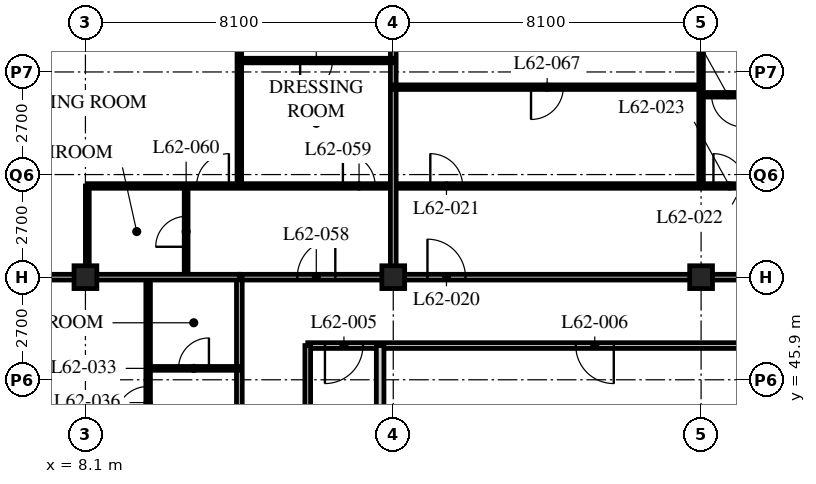
"""IFC4 building model, lengths in metres.
Left out: names, types, materials, properties, quantities, classifications, styles, units other than length and angle.
Written with IfcOpenShell. Run it as: python <this file> out.ifc"""

import sys

from ifc_helpers import new_model, si_unit, direction, frame, frame_2d, origin, origin_2d, place, context, subcontext, project, spatial, rectangle, hollow_rectangle, extrude, element, fill, save


model = new_model("IFC4")
c1 = context("Model", 3, precision=1e-05, world=origin(), true_north=direction((0.0, 1.0)))
c2 = subcontext(c1, "Body", "Model", "MODEL_VIEW")
j1 = project(units=[si_unit("LENGTHUNIT", "METRE"), si_unit("PLANEANGLEUNIT", "RADIAN")], contexts=[c1])
p1 = place(None, origin())
s1 = spatial("IfcSite", under=j1, at=p1, CompositionType="ELEMENT")
p2 = place(p1, origin())
s2 = spatial("IfcBuilding", under=s1, at=p2, CompositionType="ELEMENT")
p3 = place(p2, frame((0.0, 0.0, 242.4)))
s3 = spatial("IfcBuildingStorey", under=s2, at=p3, CompositionType="ELEMENT", Elevation=242.4)
for number, where, z_axis, x_axis in (
    (1, (8.1, 48.6, 0.0), (0.0, 0.0, 1.0), (1.0, 0.0, 0.0)),
    (2, (16.2, 48.6, 0.0), (0.0, 0.0, 1.0), (1.0, 0.0, 0.0)),
    (3, (24.3, 48.6, 0.0), (0.0, 0.0, 1.0), (1.0, 0.0, 0.0)),
):
    element("IfcColumn", number, at=place(p3, frame(where, z_axis=z_axis, x_axis=x_axis)), inside=s3, PredefinedType="COLUMN", context=c2, shape_type="SweptSolid", body=[
        extrude(hollow_rectangle(XDim=0.6, YDim=0.6, WallThickness=0.05, at=origin_2d()), origin(), (0.0, 0.0, 1.0), 3.9),
    ])
p4 = place(p3, frame((12.15, 48.6, 0.0), z_axis=(0.0, 0.0, 1.0), x_axis=(1.0, 0.0, 0.0)))
e4 = element("IfcWall", 4, at=p4, inside=s3, PredefinedType="PARTITIONING", context=c2, shape_type="SweptSolid", body=[
    extrude(rectangle(XDim=32.4, YDim=0.15, at=frame_2d((16.2, 0.0))), origin(), (0.0, 0.0, 1.0), 2.928),
])
p5 = place(p4, frame((4.95, 0.0, 0.0)))
e5 = element("IfcOpeningElement", 5, at=p5, cuts=e4, PredefinedType="OPENING", context=c2, shape_type="SweptSolid", body=[
    extrude(rectangle(XDim=1.0, YDim=2.1, at=frame_2d((0.5, 1.05))), frame((0.0, 0.085, 0.0), z_axis=(0.0, -1.0, 0.0), x_axis=(1.0, 0.0, 0.0)), (0.0, 0.0, 1.0), 0.17),
])
p6 = place(p4, frame((21.15, 0.0, 0.0)))
e6 = element("IfcOpeningElement", 6, at=p6, cuts=e4, PredefinedType="OPENING", context=c2, shape_type="SweptSolid", body=[
    extrude(rectangle(XDim=1.0, YDim=2.1, at=frame_2d((0.5, 1.05))), frame((0.0, 0.085, 0.0), z_axis=(0.0, -1.0, 0.0), x_axis=(1.0, 0.0, 0.0)), (0.0, 0.0, 1.0), 0.17),
])
p7 = place(p4, frame((29.875, 0.0, 0.0)))
e7 = element("IfcOpeningElement", 7, at=p7, cuts=e4, PredefinedType="OPENING", context=c2, shape_type="SweptSolid", body=[
    extrude(rectangle(XDim=1.0, YDim=2.1, at=frame_2d((0.5, 1.05))), frame((0.0, 0.085, 0.0), z_axis=(0.0, -1.0, 0.0), x_axis=(1.0, 0.0, 0.0)), (0.0, 0.0, 1.0), 0.17),
])
p8 = place(p4, frame((1.525, 0.0, 0.0)))
e8 = element("IfcOpeningElement", 8, at=p8, cuts=e4, PredefinedType="OPENING", context=c2, shape_type="SweptSolid", body=[
    extrude(rectangle(XDim=1.0, YDim=2.1, at=frame_2d((0.5, 1.05))), frame((0.0, 0.085, 0.0), z_axis=(0.0, -1.0, 0.0), x_axis=(1.0, 0.0, 0.0)), (0.0, 0.0, 1.0), 0.17),
])
p9 = place(p3, frame((12.15, 22.5, 0.0), z_axis=(0.0, 0.0, 1.0), x_axis=(0.0, 1.0, 0.0)))
e9 = element("IfcWall", 9, at=p9, inside=s3, PredefinedType="PARTITIONING", context=c2, shape_type="SweptSolid", body=[
    extrude(rectangle(XDim=26.1, YDim=0.15, at=frame_2d((13.05, 0.0))), origin(), (0.0, 0.0, 1.0), 3.69),
])
p10 = place(p9, frame((0.4, 0.0, 0.0)))
e10 = element("IfcOpeningElement", 10, at=p10, cuts=e9, PredefinedType="OPENING", context=c2, shape_type="SweptSolid", body=[
    extrude(rectangle(XDim=1.0, YDim=2.1, at=frame_2d((0.5, 1.05))), frame((0.0, 0.085, 0.0), z_axis=(0.0, -1.0, 0.0), x_axis=(1.0, 0.0, 0.0)), (0.0, 0.0, 1.0), 0.17),
])
p11 = place(p9, frame((14.35, 0.0, 0.0)))
e11 = element("IfcOpeningElement", 11, at=p11, cuts=e9, PredefinedType="OPENING", context=c2, shape_type="SweptSolid", body=[
    extrude(rectangle(XDim=1.0, YDim=2.1, at=frame_2d((0.5, 1.05))), frame((0.0, 0.085, 0.0), z_axis=(0.0, -1.0, 0.0), x_axis=(1.0, 0.0, 0.0)), (0.0, 0.0, 1.0), 0.17),
])
p12 = place(p3, frame((27.14, 46.8, 0.0), z_axis=(0.0, 0.0, 1.0), x_axis=(-1.0, 0.0, 0.0)))
e12 = element("IfcWall", 12, at=p12, inside=s3, PredefinedType="PARTITIONING", context=c2, shape_type="SweptSolid", body=[
    extrude(rectangle(XDim=13.19, YDim=0.15, at=frame_2d((6.595, 0.0))), origin(), (0.0, 0.0, 1.0), 3.69),
])
p13 = place(p12, frame((11.738, 0.0, 0.0)))
e13 = element("IfcOpeningElement", 13, at=p13, cuts=e12, PredefinedType="OPENING", context=c2, shape_type="SweptSolid", body=[
    extrude(rectangle(XDim=1.0, YDim=2.1, at=frame_2d((0.5, 1.05))), frame((0.0, 0.085, 0.0), z_axis=(0.0, -1.0, 0.0), x_axis=(1.0, 0.0, 0.0)), (0.0, 0.0, 1.0), 0.17),
])
p14 = place(p12, frame((5.138, 0.0, 0.0)))
e14 = element("IfcOpeningElement", 14, at=p14, cuts=e12, PredefinedType="OPENING", context=c2, shape_type="SweptSolid", body=[
    extrude(rectangle(XDim=1.0, YDim=2.1, at=frame_2d((0.5, 1.05))), frame((0.0, 0.085, 0.0), z_axis=(0.0, -1.0, 0.0), x_axis=(1.0, 0.0, 0.0)), (0.0, 0.0, 1.0), 0.17),
])
p15 = place(p3, frame((13.95, 46.8, 0.0), z_axis=(0.0, 0.0, 1.0), x_axis=(0.0, -1.0, 0.0)))
e15 = element("IfcWall", 15, at=p15, inside=s3, PredefinedType="PARTITIONING", context=c2, shape_type="SweptSolid", body=[
    extrude(rectangle(XDim=22.5, YDim=0.15, at=frame_2d((11.25, 0.0))), origin(), (0.0, 0.0, 1.0), 3.69),
])
p16 = place(p15, frame((17.95, 0.0, 0.0)))
e16 = element("IfcOpeningElement", 16, at=p16, cuts=e15, PredefinedType="OPENING", context=c2, shape_type="SweptSolid", body=[
    extrude(rectangle(XDim=1.0, YDim=2.1, at=frame_2d((0.5, 1.05))), frame((0.0, 0.085, 0.0), z_axis=(0.0, -1.0, 0.0), x_axis=(1.0, 0.0, 0.0)), (0.0, 0.0, 1.0), 0.17),
])
p17 = place(p15, frame((9.85, 0.0, 0.0)))
e17 = element("IfcOpeningElement", 17, at=p17, cuts=e15, PredefinedType="OPENING", context=c2, shape_type="SweptSolid", body=[
    extrude(rectangle(XDim=1.0, YDim=2.1, at=frame_2d((0.5, 1.05))), frame((0.0, 0.085, 0.0), z_axis=(0.0, -1.0, 0.0), x_axis=(1.0, 0.0, 0.0)), (0.0, 0.0, 1.0), 0.17),
])
p18 = place(p3, frame((15.855, 46.8, 0.0), z_axis=(0.0, 0.0, 1.0), x_axis=(0.0, -1.0, 0.0)))
e18 = element("IfcWall", 18, at=p18, inside=s3, PredefinedType="SOLIDWALL", context=c2, shape_type="SweptSolid", body=[
    extrude(rectangle(XDim=6.3, YDim=0.2, at=frame_2d((3.15, 0.0))), origin(), (0.0, 0.0, 1.0), 3.69),
])
p19 = place(p3, frame((24.3, 51.0, 0.0), z_axis=(0.0, 0.0, 1.0), x_axis=(0.0, 1.0, 0.0)))
e19 = element("IfcWall", 19, at=p19, inside=s3, PredefinedType="PARTITIONING", context=c2, shape_type="SweptSolid", body=[
    extrude(rectangle(XDim=13.5, YDim=0.12, at=frame_2d((6.75, 0.0))), origin(), (0.0, 0.0, 1.0), 2.928),
])
p20 = place(p3, frame((9.75, 22.5, 0.0), z_axis=(0.0, 0.0, 1.0), x_axis=(0.0, 1.0, 0.0)))
e20 = element("IfcWall", 20, at=p20, inside=s3, PredefinedType="PARTITIONING", context=c2, shape_type="SweptSolid", body=[
    extrude(rectangle(XDim=26.1, YDim=0.12, at=frame_2d((13.05, 0.0))), origin(), (0.0, 0.0, 1.0), 3.69),
])
p21 = place(p20, frame((0.975, 0.0, 0.0)))
e21 = element("IfcOpeningElement", 21, at=p21, cuts=e20, PredefinedType="OPENING", context=c2, shape_type="SweptSolid", body=[
    extrude(rectangle(XDim=0.85, YDim=2.1, at=frame_2d((0.425, 1.05))), frame((0.0, 0.07, 0.0), z_axis=(0.0, -1.0, 0.0), x_axis=(1.0, 0.0, 0.0)), (0.0, 0.0, 1.0), 0.14),
])
p22 = place(p20, frame((10.225, 0.0, 0.0)))
e22 = element("IfcOpeningElement", 22, at=p22, cuts=e20, PredefinedType="OPENING", context=c2, shape_type="SweptSolid", body=[
    extrude(rectangle(XDim=0.85, YDim=2.1, at=frame_2d((0.425, 1.05))), frame((0.0, 0.07, 0.0), z_axis=(0.0, -1.0, 0.0), x_axis=(1.0, 0.0, 0.0)), (0.0, 0.0, 1.0), 0.14),
])
p23 = place(p20, frame((14.925, 0.0, 0.0)))
e23 = element("IfcOpeningElement", 23, at=p23, cuts=e20, PredefinedType="OPENING", context=c2, shape_type="SweptSolid", body=[
    extrude(rectangle(XDim=0.85, YDim=2.1, at=frame_2d((0.425, 1.05))), frame((0.0, 0.07, 0.0), z_axis=(0.0, -1.0, 0.0), x_axis=(1.0, 0.0, 0.0)), (0.0, 0.0, 1.0), 0.14),
])
p24 = place(p20, frame((22.375, 0.0, 0.0)))
e24 = element("IfcOpeningElement", 24, at=p24, cuts=e20, PredefinedType="OPENING", context=c2, shape_type="SweptSolid", body=[
    extrude(rectangle(XDim=0.85, YDim=2.1, at=frame_2d((0.425, 1.05))), frame((0.0, 0.07, 0.0), z_axis=(0.0, -1.0, 0.0), x_axis=(1.0, 0.0, 0.0)), (0.0, 0.0, 1.0), 0.14),
])
p25 = place(p3, frame((12.15, 46.2, 0.0), z_axis=(0.0, 0.0, 1.0), x_axis=(-1.0, 0.0, 0.0)))
e25 = element("IfcWall", 25, at=p25, inside=s3, PredefinedType="PARTITIONING", context=c2, shape_type="SweptSolid", body=[
    extrude(rectangle(XDim=2.4, YDim=0.1, at=frame_2d((1.2, 0.0))), origin(), (0.0, 0.0, 1.0), 3.69),
])
p26 = place(p25, frame((0.8, 0.0, 0.0)))
e26 = element("IfcOpeningElement", 26, at=p26, cuts=e25, PredefinedType="OPENING", context=c2, shape_type="SweptSolid", body=[
    extrude(rectangle(XDim=0.8, YDim=2.1, at=frame_2d((0.4, 1.05))), frame((0.0, 0.06, 0.0), z_axis=(0.0, -1.0, 0.0), x_axis=(1.0, 0.0, 0.0)), (0.0, 0.0, 1.0), 0.12),
])
p27 = place(p3, frame((10.75, 48.6, 0.0), z_axis=(0.0, 0.0, 1.0), x_axis=(0.0, 1.0, 0.0)))
e27 = element("IfcWall", 27, at=p27, inside=s3, PredefinedType="PARTITIONING", context=c2, shape_type="SweptSolid", body=[
    extrude(rectangle(XDim=2.4, YDim=0.1, at=frame_2d((1.2, 0.0))), origin(), (0.0, 0.0, 1.0), 3.69),
])
p28 = place(p27, frame((0.8, 0.0, 0.0)))
e28 = element("IfcOpeningElement", 28, at=p28, cuts=e27, PredefinedType="OPENING", context=c2, shape_type="SweptSolid", body=[
    extrude(rectangle(XDim=0.8, YDim=2.1, at=frame_2d((0.4, 1.05))), frame((0.0, 0.06, 0.0), z_axis=(0.0, -1.0, 0.0), x_axis=(1.0, 0.0, 0.0)), (0.0, 0.0, 1.0), 0.12),
])
p29 = place(p3, frame((8.15, 48.6, 0.0), z_axis=(0.0, 0.0, 1.0), x_axis=(0.0, 1.0, 0.0)))
e29 = element("IfcWall", 29, at=p29, inside=s3, PredefinedType="PARTITIONING", context=c2, shape_type="SweptSolid", body=[
    extrude(rectangle(XDim=2.4, YDim=0.1, at=frame_2d((1.2, 0.0))), origin(), (0.0, 0.0, 1.0), 2.928),
])
p30 = place(p3, frame((8.15, 51.0, 0.0), z_axis=(0.0, 0.0, 1.0), x_axis=(1.0, 0.0, 0.0)))
e30 = element("IfcWall", 30, at=p30, inside=s3, PredefinedType="PARTITIONING", context=c2, shape_type="SweptSolid", body=[
    extrude(rectangle(XDim=40.4, YDim=0.12, at=frame_2d((20.2, 0.0))), origin(), (0.0, 0.0, 1.0), 3.69),
])
p31 = place(p30, frame((9.025, 0.0, 0.0)))
e31 = element("IfcOpeningElement", 31, at=p31, cuts=e30, PredefinedType="OPENING", context=c2, shape_type="SweptSolid", body=[
    extrude(rectangle(XDim=0.85, YDim=2.1, at=frame_2d((0.425, 1.05))), frame((0.0, 0.07, 0.0), z_axis=(0.0, -1.0, 0.0), x_axis=(1.0, 0.0, 0.0)), (0.0, 0.0, 1.0), 0.14),
])
p32 = place(p30, frame((16.475, 0.0, 0.0)))
e32 = element("IfcOpeningElement", 32, at=p32, cuts=e30, PredefinedType="OPENING", context=c2, shape_type="SweptSolid", body=[
    extrude(rectangle(XDim=0.85, YDim=2.1, at=frame_2d((0.425, 1.05))), frame((0.0, 0.07, 0.0), z_axis=(0.0, -1.0, 0.0), x_axis=(1.0, 0.0, 0.0)), (0.0, 0.0, 1.0), 0.14),
])
p33 = place(p30, frame((20.525, 0.0, 0.0)))
e33 = element("IfcOpeningElement", 33, at=p33, cuts=e30, PredefinedType="OPENING", context=c2, shape_type="SweptSolid", body=[
    extrude(rectangle(XDim=0.85, YDim=2.1, at=frame_2d((0.425, 1.05))), frame((0.0, 0.07, 0.0), z_axis=(0.0, -1.0, 0.0), x_axis=(1.0, 0.0, 0.0)), (0.0, 0.0, 1.0), 0.14),
])
p34 = place(p30, frame((25.225, 0.0, 0.0)))
e34 = element("IfcOpeningElement", 34, at=p34, cuts=e30, PredefinedType="OPENING", context=c2, shape_type="SweptSolid", body=[
    extrude(rectangle(XDim=0.85, YDim=2.1, at=frame_2d((0.425, 1.05))), frame((0.0, 0.07, 0.0), z_axis=(0.0, -1.0, 0.0), x_axis=(1.0, 0.0, 0.0)), (0.0, 0.0, 1.0), 0.14),
])
p35 = place(p30, frame((28.625, 0.0, 0.0)))
e35 = element("IfcOpeningElement", 35, at=p35, cuts=e30, PredefinedType="OPENING", context=c2, shape_type="SweptSolid", body=[
    extrude(rectangle(XDim=0.85, YDim=2.1, at=frame_2d((0.425, 1.05))), frame((0.0, 0.07, 0.0), z_axis=(0.0, -1.0, 0.0), x_axis=(1.0, 0.0, 0.0)), (0.0, 0.0, 1.0), 0.14),
])
p36 = place(p30, frame((32.825, 0.0, 0.0)))
e36 = element("IfcOpeningElement", 36, at=p36, cuts=e30, PredefinedType="OPENING", context=c2, shape_type="SweptSolid", body=[
    extrude(rectangle(XDim=0.85, YDim=2.1, at=frame_2d((0.425, 1.05))), frame((0.0, 0.07, 0.0), z_axis=(0.0, -1.0, 0.0), x_axis=(1.0, 0.0, 0.0)), (0.0, 0.0, 1.0), 0.14),
])
p37 = place(p30, frame((36.675, 0.0, 0.0)))
e37 = element("IfcOpeningElement", 37, at=p37, cuts=e30, PredefinedType="OPENING", context=c2, shape_type="SweptSolid", body=[
    extrude(rectangle(XDim=0.85, YDim=2.1, at=frame_2d((0.425, 1.05))), frame((0.0, 0.07, 0.0), z_axis=(0.0, -1.0, 0.0), x_axis=(1.0, 0.0, 0.0)), (0.0, 0.0, 1.0), 0.14),
])
p38 = place(p30, frame((6.725, 0.0, 0.0)))
e38 = element("IfcOpeningElement", 38, at=p38, cuts=e30, PredefinedType="OPENING", context=c2, shape_type="SweptSolid", body=[
    extrude(rectangle(XDim=0.85, YDim=2.1, at=frame_2d((0.425, 1.05))), frame((0.0, 0.07, 0.0), z_axis=(0.0, -1.0, 0.0), x_axis=(1.0, 0.0, 0.0)), (0.0, 0.0, 1.0), 0.14),
])
p39 = place(p30, frame((2.875, 0.0, 0.0)))
e39 = element("IfcOpeningElement", 39, at=p39, cuts=e30, PredefinedType="OPENING", context=c2, shape_type="SweptSolid", body=[
    extrude(rectangle(XDim=0.85, YDim=2.1, at=frame_2d((0.425, 1.05))), frame((0.0, 0.07, 0.0), z_axis=(0.0, -1.0, 0.0), x_axis=(1.0, 0.0, 0.0)), (0.0, 0.0, 1.0), 0.14),
])
p40 = place(p3, frame((12.15, 51.0, 0.0), z_axis=(0.0, 0.0, 1.0), x_axis=(0.0, 1.0, 0.0)))
e40 = element("IfcWall", 40, at=p40, inside=s3, PredefinedType="PARTITIONING", context=c2, shape_type="SweptSolid", body=[
    extrude(rectangle(XDim=13.5, YDim=0.12, at=frame_2d((6.75, 0.0))), origin(), (0.0, 0.0, 1.0), 3.69),
])
p41 = place(p3, frame((0.3, 48.6, 0.0), z_axis=(0.0, 0.0, 1.0), x_axis=(1.0, 0.0, 0.0)))
e41 = element("IfcWall", 41, at=p41, inside=s3, PredefinedType="PARTITIONING", context=c2, shape_type="SweptSolid", body=[
    extrude(rectangle(XDim=11.85, YDim=0.15, at=frame_2d((5.925, 0.0))), origin(), (0.0, 0.0, 1.0), 2.928),
])
p42 = place(p3, frame((16.2, 48.6, 0.0), z_axis=(0.0, 0.0, 1.0), x_axis=(0.0, 1.0, 0.0)))
e42 = element("IfcWall", 42, at=p42, inside=s3, PredefinedType="PARTITIONING", context=c2, shape_type="SweptSolid", body=[
    extrude(rectangle(XDim=15.9, YDim=0.15, at=frame_2d((7.95, 0.0))), origin(), (0.0, 0.0, 1.0), 2.928),
])
p43 = place(p3, frame((24.3, 53.4, 0.0), z_axis=(0.0, 0.0, 1.0), x_axis=(1.0, 0.0, 0.0)))
e43 = element("IfcWall", 43, at=p43, inside=s3, PredefinedType="PARTITIONING", context=c2, shape_type="SweptSolid", body=[
    extrude(rectangle(XDim=1.76, YDim=0.12, at=frame_2d((0.88, 0.0))), origin(), (0.0, 0.0, 1.0), 3.69),
])
p44 = place(p43, frame((0.275, 0.0, 0.0)))
e44 = element("IfcOpeningElement", 44, at=p44, cuts=e43, PredefinedType="OPENING", context=c2, shape_type="SweptSolid", body=[
    extrude(rectangle(XDim=0.85, YDim=2.1, at=frame_2d((0.425, 1.05))), frame((0.0, 0.07, 0.0), z_axis=(0.0, -1.0, 0.0), x_axis=(1.0, 0.0, 0.0)), (0.0, 0.0, 1.0), 0.14),
])
p45 = place(p3, frame((16.2, 53.6, 0.0), z_axis=(0.0, 0.0, 1.0), x_axis=(1.0, 0.0, 0.0)))
e45 = element("IfcWall", 45, at=p45, inside=s3, PredefinedType="PARTITIONING", context=c2, shape_type="SweptSolid", body=[
    extrude(rectangle(XDim=8.1, YDim=0.12, at=frame_2d((4.05, 0.0))), origin(), (0.0, 0.0, 1.0), 3.69),
])
p46 = place(p45, frame((3.625, 0.0, 0.0)))
e46 = element("IfcOpeningElement", 46, at=p46, cuts=e45, PredefinedType="OPENING", context=c2, shape_type="SweptSolid", body=[
    extrude(rectangle(XDim=0.85, YDim=2.1, at=frame_2d((0.425, 1.05))), frame((0.0, 0.07, 0.0), z_axis=(0.0, -1.0, 0.0), x_axis=(1.0, 0.0, 0.0)), (0.0, 0.0, 1.0), 0.14),
])
p47 = place(p3, frame((12.15, 54.3, 0.0), z_axis=(0.0, 0.0, 1.0), x_axis=(1.0, 0.0, 0.0)))
e47 = element("IfcWall", 47, at=p47, inside=s3, PredefinedType="PARTITIONING", context=c2, shape_type="SweptSolid", body=[
    extrude(rectangle(XDim=4.05, YDim=0.12, at=frame_2d((2.025, 0.0))), origin(), (0.0, 0.0, 1.0), 3.69),
])
p48 = place(p47, frame((1.6, 0.0, 0.0)))
e48 = element("IfcOpeningElement", 48, at=p48, cuts=e47, PredefinedType="OPENING", context=c2, shape_type="SweptSolid", body=[
    extrude(rectangle(XDim=0.85, YDim=2.1, at=frame_2d((0.425, 1.05))), frame((0.0, 0.07, 0.0), z_axis=(0.0, -1.0, 0.0), x_axis=(1.0, 0.0, 0.0)), (0.0, 0.0, 1.0), 0.14),
])
p49 = place(p13, origin())
e49 = element("IfcDoor", 49, at=p49, inside=s3, OperationType="SINGLE_SWING_RIGHT", PredefinedType="DOOR", context=c2, shape_type="SweptSolid", body=[
    extrude(rectangle(XDim=1.0, YDim=2.1, at=frame_2d((0.5, 1.05))), frame((0.0, 0.025, 0.0), z_axis=(0.0, -1.0, 0.0), x_axis=(1.0, 0.0, 0.0)), (0.0, 0.0, 1.0), 0.05),
])
fill(e13, e49)
p50 = place(p14, origin())
e50 = element("IfcDoor", 50, at=p50, inside=s3, OperationType="SINGLE_SWING_LEFT", PredefinedType="DOOR", context=c2, shape_type="SweptSolid", body=[
    extrude(rectangle(XDim=1.0, YDim=2.1, at=frame_2d((0.5, 1.05))), frame((0.0, 0.025, 0.0), z_axis=(0.0, -1.0, 0.0), x_axis=(1.0, 0.0, 0.0)), (0.0, 0.0, 1.0), 0.05),
])
fill(e14, e50)
p51 = place(p5, origin())
e51 = element("IfcDoor", 51, at=p51, inside=s3, OperationType="SINGLE_SWING_LEFT", PredefinedType="DOOR", context=c2, shape_type="SweptSolid", body=[
    extrude(rectangle(XDim=1.0, YDim=2.1, at=frame_2d((0.5, 1.05))), frame((0.0, 0.025, 0.0), z_axis=(0.0, -1.0, 0.0), x_axis=(1.0, 0.0, 0.0)), (0.0, 0.0, 1.0), 0.05),
])
fill(e5, e51)
p52 = place(p31, origin())
e52 = element("IfcDoor", 52, at=p52, inside=s3, OperationType="SINGLE_SWING_LEFT", PredefinedType="DOOR", context=c2, shape_type="SweptSolid", body=[
    extrude(rectangle(XDim=0.85, YDim=2.1, at=frame_2d((0.425, 1.05))), frame((0.0, 0.025, 0.0), z_axis=(0.0, -1.0, 0.0), x_axis=(1.0, 0.0, 0.0)), (0.0, 0.0, 1.0), 0.05),
])
fill(e31, e52)
p53 = place(p32, origin())
e53 = element("IfcDoor", 53, at=p53, inside=s3, OperationType="SINGLE_SWING_LEFT", PredefinedType="DOOR", context=c2, shape_type="SweptSolid", body=[
    extrude(rectangle(XDim=0.85, YDim=2.1, at=frame_2d((0.425, 1.05))), frame((0.0, 0.025, 0.0), z_axis=(0.0, -1.0, 0.0), x_axis=(1.0, 0.0, 0.0)), (0.0, 0.0, 1.0), 0.05),
])
fill(e32, e53)
p54 = place(p26, origin())
e54 = element("IfcDoor", 54, at=p54, inside=s3, OperationType="SINGLE_SWING_RIGHT", PredefinedType="DOOR", context=c2, shape_type="SweptSolid", body=[
    extrude(rectangle(XDim=0.8, YDim=2.1, at=frame_2d((0.4, 1.05))), frame((0.0, 0.025, 0.0), z_axis=(0.0, -1.0, 0.0), x_axis=(1.0, 0.0, 0.0)), (0.0, 0.0, 1.0), 0.05),
])
fill(e26, e54)
p55 = place(p24, origin())
e55 = element("IfcDoor", 55, at=p55, inside=s3, OperationType="SINGLE_SWING_LEFT", PredefinedType="DOOR", context=c2, shape_type="SweptSolid", body=[
    extrude(rectangle(XDim=0.85, YDim=2.1, at=frame_2d((0.425, 1.05))), frame((0.0, 0.025, 0.0), z_axis=(0.0, -1.0, 0.0), x_axis=(1.0, 0.0, 0.0)), (0.0, 0.0, 1.0), 0.05),
])
fill(e24, e55)
p56 = place(p8, origin())
e56 = element("IfcDoor", 56, at=p56, inside=s3, OperationType="SINGLE_SWING_RIGHT", PredefinedType="DOOR", context=c2, shape_type="SweptSolid", body=[
    extrude(rectangle(XDim=1.0, YDim=2.1, at=frame_2d((0.5, 1.05))), frame((0.0, 0.025, 0.0), z_axis=(0.0, -1.0, 0.0), x_axis=(1.0, 0.0, 0.0)), (0.0, 0.0, 1.0), 0.05),
])
fill(e8, e56)
p57 = place(p38, origin())
e57 = element("IfcDoor", 57, at=p57, inside=s3, OperationType="SINGLE_SWING_LEFT", PredefinedType="DOOR", context=c2, shape_type="SweptSolid", body=[
    extrude(rectangle(XDim=0.85, YDim=2.1, at=frame_2d((0.425, 1.05))), frame((0.0, 0.025, 0.0), z_axis=(0.0, -1.0, 0.0), x_axis=(1.0, 0.0, 0.0)), (0.0, 0.0, 1.0), 0.05),
])
fill(e38, e57)
p58 = place(p28, origin())
e58 = element("IfcDoor", 58, at=p58, inside=s3, OperationType="SINGLE_SWING_LEFT", PredefinedType="DOOR", context=c2, shape_type="SweptSolid", body=[
    extrude(rectangle(XDim=0.8, YDim=2.1, at=frame_2d((0.4, 1.05))), frame((0.0, 0.025, 0.0), z_axis=(0.0, -1.0, 0.0), x_axis=(1.0, 0.0, 0.0)), (0.0, 0.0, 1.0), 0.05),
])
fill(e28, e58)
p59 = place(p39, origin())
e59 = element("IfcDoor", 59, at=p59, inside=s3, OperationType="SINGLE_SWING_RIGHT", PredefinedType="DOOR", context=c2, shape_type="SweptSolid", body=[
    extrude(rectangle(XDim=0.85, YDim=2.1, at=frame_2d((0.425, 1.05))), frame((0.0, 0.025, 0.0), z_axis=(0.0, -1.0, 0.0), x_axis=(1.0, 0.0, 0.0)), (0.0, 0.0, 1.0), 0.05),
])
fill(e39, e59)
p60 = place(p44, origin())
e60 = element("IfcDoor", 60, at=p60, inside=s3, OperationType="SINGLE_SWING_LEFT", PredefinedType="DOOR", context=c2, shape_type="SweptSolid", body=[
    extrude(rectangle(XDim=0.85, YDim=2.1, at=frame_2d((0.425, 1.05))), frame((0.0, 0.025, 0.0), z_axis=(0.0, -1.0, 0.0), x_axis=(1.0, 0.0, 0.0)), (0.0, 0.0, 1.0), 0.05),
])
fill(e44, e60)
p61 = place(p46, origin())
e61 = element("IfcDoor", 61, at=p61, inside=s3, OperationType="SINGLE_SWING_RIGHT", PredefinedType="DOOR", context=c2, shape_type="SweptSolid", body=[
    extrude(rectangle(XDim=0.85, YDim=2.1, at=frame_2d((0.425, 1.05))), frame((0.0, 0.025, 0.0), z_axis=(0.0, -1.0, 0.0), x_axis=(1.0, 0.0, 0.0)), (0.0, 0.0, 1.0), 0.05),
])
fill(e46, e61)
p62 = place(p48, origin())
e62 = element("IfcDoor", 62, at=p62, inside=s3, OperationType="SINGLE_SWING_RIGHT", PredefinedType="DOOR", context=c2, shape_type="SweptSolid", body=[
    extrude(rectangle(XDim=0.85, YDim=2.1, at=frame_2d((0.425, 1.05))), frame((0.0, 0.025, 0.0), z_axis=(0.0, -1.0, 0.0), x_axis=(1.0, 0.0, 0.0)), (0.0, 0.0, 1.0), 0.05),
])
fill(e48, e62)
save(model, sys.argv[1])
